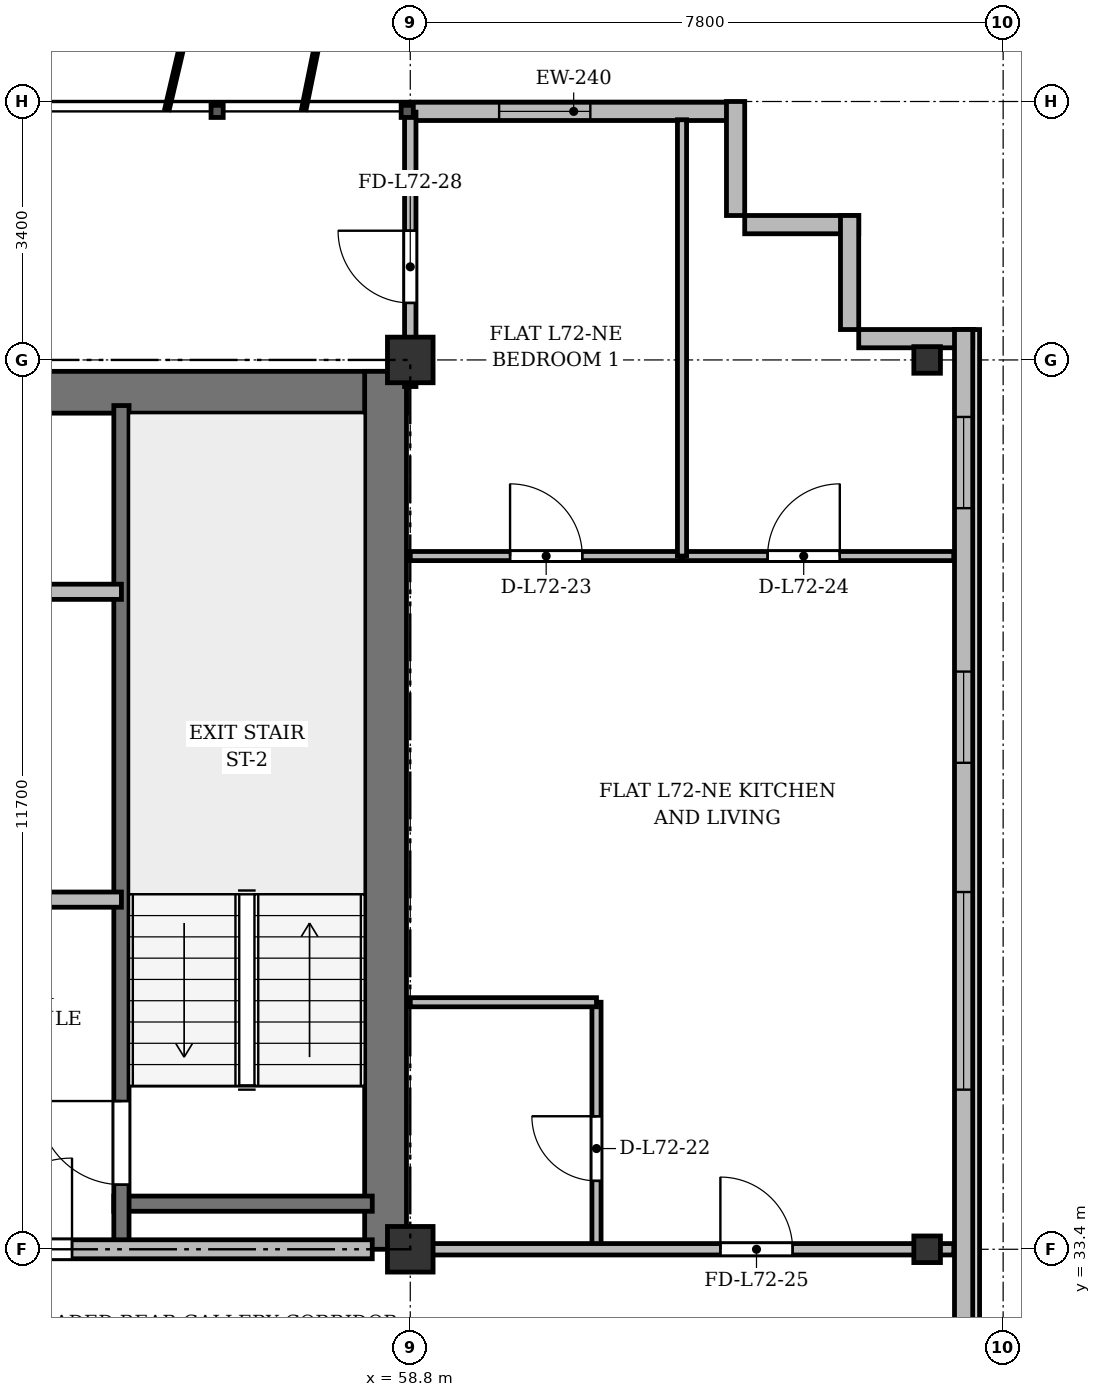
"""IFC4 building model, lengths in metres.
Left out: names, types, materials, properties, quantities, classifications, styles, units other than length and angle.
Written with IfcOpenShell. Run it as: python <this file> out.ifc"""

import sys

from ifc_helpers import new_model, si_unit, direction, frame, frame_2d, origin, origin_2d, place, context, subcontext, project, spatial, rectangle, i_section, extrude, source, transform, mapped, element, fill, save


model = new_model("IFC4")
c1 = context("Model", 3, precision=1e-05, world=origin(), true_north=direction((0.0, 1.0)))
c2 = subcontext(c1, "Body", "Model", "MODEL_VIEW")
j1 = project(units=[si_unit("LENGTHUNIT", "METRE"), si_unit("PLANEANGLEUNIT", "RADIAN")], contexts=[c1])
p1 = place(None, origin())
s1 = spatial("IfcSite", under=j1, at=p1, CompositionType="ELEMENT")
p2 = place(p1, origin())
s2 = spatial("IfcBuilding", under=s1, at=p2, CompositionType="ELEMENT")
p3 = place(p2, frame((0.0, 0.0, 277.5)))
s3 = spatial("IfcBuildingStorey", under=s2, at=p3, CompositionType="ELEMENT", Elevation=277.5)
m1 = source(origin(), c2, "Body", "SweptSolid", [
    extrude(rectangle(XDim=0.6, YDim=0.6, at=origin_2d()), origin(), (0.0, 0.0, 1.0), 3.6),
])
for number, where, z_axis, x_axis in (
    (1, (58.8, 33.4, 0.0), (0.0, 0.0, 1.0), (1.0, 0.0, 0.0)),
    (2, (58.8, 45.1, 0.0), (0.0, 0.0, 1.0), (1.0, 0.0, 0.0)),
):
    element("IfcColumn", number, at=place(p3, frame(where, z_axis=z_axis, x_axis=x_axis)), inside=s3, PredefinedType="COLUMN", context=c2, shape_type="MappedRepresentation", body=[
        mapped(m1, transform((0.0, 0.0, 0.0), x_axis=(1.0, 0.0, 0.0), y_axis=(0.0, 1.0, 0.0), z_axis=(0.0, 0.0, 1.0), scale=1.0)),
    ])
m2 = source(origin(), c2, "Body", "SweptSolid", [
    extrude(i_section(OverallWidth=0.35, OverallDepth=0.35, WebThickness=0.018, FlangeThickness=0.028, at=origin_2d()), origin(), (0.0, 0.0, 1.0), 3.6),
])
for number, where, z_axis, x_axis in (
    (3, (65.6, 33.4, 0.0), (0.0, 0.0, 1.0), (1.0, 0.0, 0.0)),
    (4, (65.6, 45.1, 0.0), (0.0, 0.0, 1.0), (1.0, 0.0, 0.0)),
):
    element("IfcColumn", number, at=place(p3, frame(where, z_axis=z_axis, x_axis=x_axis)), inside=s3, PredefinedType="COLUMN", context=c2, shape_type="MappedRepresentation", body=[
        mapped(m2, transform((0.0, 0.0, 0.0), x_axis=(1.0, 0.0, 0.0), y_axis=(0.0, 1.0, 0.0), z_axis=(0.0, 0.0, 1.0), scale=1.0)),
    ])
p4 = place(p3, frame((58.8, 48.37, 0.0), z_axis=(0.0, 0.0, 1.0), x_axis=(1.0, 0.0, 0.0)))
e5 = element("IfcWall", 5, at=p4, inside=s3, PredefinedType="SOLIDWALL", context=c2, shape_type="SweptSolid", body=[
    extrude(rectangle(XDim=4.3, YDim=0.24, at=frame_2d((2.15, 0.0))), origin(), (0.0, 0.0, 1.0), 3.37),
])
p5 = place(p4, frame((1.169, 0.0, 0.9)))
e6 = element("IfcOpeningElement", 6, at=p5, cuts=e5, PredefinedType="OPENING", context=c2, shape_type="SweptSolid", body=[
    extrude(rectangle(XDim=1.2, YDim=1.65, at=frame_2d((0.6, 0.825))), frame((0.0, 0.13, 0.0), z_axis=(0.0, -1.0, 0.0), x_axis=(1.0, 0.0, 0.0)), (0.0, 0.0, 1.0), 0.26),
])
for number, where, z_axis, x_axis in (
    (7, (63.08, 48.5, 0.0), (0.0, 0.0, 1.0), (0.0, -1.0, 0.0)),
    (8, (63.2, 46.88, 0.0), (0.0, 0.0, 1.0), (1.0, 0.0, 0.0)),
    (9, (64.58, 47.0, 0.0), (0.0, 0.0, 1.0), (0.0, -1.0, 0.0)),
    (10, (64.7, 45.38, 0.0), (0.0, 0.0, 1.0), (1.0, 0.0, 0.0)),
):
    element("IfcWall", number, at=place(p3, frame(where, z_axis=z_axis, x_axis=x_axis)), inside=s3, PredefinedType="SOLIDWALL", context=c2, shape_type="SweptSolid", body=[
        extrude(rectangle(XDim=1.5, YDim=0.24, at=frame_2d((0.75, 0.0))), origin(), (0.0, 0.0, 1.0), 3.37),
    ])
p6 = place(p3, frame((66.08, 45.5, 0.0), z_axis=(0.0, 0.0, 1.0), x_axis=(0.0, -1.0, 0.0)))
e11 = element("IfcWall", 11, at=p6, inside=s3, PredefinedType="SOLIDWALL", context=c2, shape_type="SweptSolid", body=[
    extrude(rectangle(XDim=39.0, YDim=0.24, at=frame_2d((19.5, 0.0))), origin(), (0.0, 0.0, 1.0), 3.37),
])
p7 = place(p6, frame((36.35, 0.0, 0.92)))
e12 = element("IfcOpeningElement", 12, at=p7, cuts=e11, PredefinedType="OPENING", context=c2, shape_type="SweptSolid", body=[
    extrude(rectangle(XDim=1.2, YDim=1.65, at=frame_2d((0.6, 0.825))), frame((0.0, 0.13, 0.0), z_axis=(0.0, -1.0, 0.0), x_axis=(1.0, 0.0, 0.0)), (0.0, 0.0, 1.0), 0.26),
])
p8 = place(p6, frame((32.8, 0.0, 0.92)))
e13 = element("IfcOpeningElement", 13, at=p8, cuts=e11, PredefinedType="OPENING", context=c2, shape_type="SweptSolid", body=[
    extrude(rectangle(XDim=2.6, YDim=1.9, at=frame_2d((1.3, 0.95))), frame((0.0, 0.13, 0.0), z_axis=(0.0, -1.0, 0.0), x_axis=(1.0, 0.0, 0.0)), (0.0, 0.0, 1.0), 0.26),
])
p9 = place(p6, frame((28.6, 0.0, 0.92)))
e14 = element("IfcOpeningElement", 14, at=p9, cuts=e11, PredefinedType="OPENING", context=c2, shape_type="SweptSolid", body=[
    extrude(rectangle(XDim=2.6, YDim=1.9, at=frame_2d((1.3, 0.95))), frame((0.0, 0.13, 0.0), z_axis=(0.0, -1.0, 0.0), x_axis=(1.0, 0.0, 0.0)), (0.0, 0.0, 1.0), 0.26),
])
p10 = place(p6, frame((21.4, 0.0, 0.92)))
e15 = element("IfcOpeningElement", 15, at=p10, cuts=e11, PredefinedType="OPENING", context=c2, shape_type="SweptSolid", body=[
    extrude(rectangle(XDim=2.6, YDim=1.9, at=frame_2d((1.3, 0.95))), frame((0.0, 0.13, 0.0), z_axis=(0.0, -1.0, 0.0), x_axis=(1.0, 0.0, 0.0)), (0.0, 0.0, 1.0), 0.26),
])
p11 = place(p6, frame((7.4, 0.0, 0.92)))
e16 = element("IfcOpeningElement", 16, at=p11, cuts=e11, PredefinedType="OPENING", context=c2, shape_type="SweptSolid", body=[
    extrude(rectangle(XDim=2.6, YDim=1.9, at=frame_2d((1.3, 0.95))), frame((0.0, 0.13, 0.0), z_axis=(0.0, -1.0, 0.0), x_axis=(1.0, 0.0, 0.0)), (0.0, 0.0, 1.0), 0.26),
])
p12 = place(p6, frame((4.5, 0.0, 0.92)))
e17 = element("IfcOpeningElement", 17, at=p12, cuts=e11, PredefinedType="OPENING", context=c2, shape_type="SweptSolid", body=[
    extrude(rectangle(XDim=1.2, YDim=1.65, at=frame_2d((0.6, 0.825))), frame((0.0, 0.13, 0.0), z_axis=(0.0, -1.0, 0.0), x_axis=(1.0, 0.0, 0.0)), (0.0, 0.0, 1.0), 0.26),
])
p13 = place(p6, frame((1.15, 0.0, 0.92)))
e18 = element("IfcOpeningElement", 18, at=p13, cuts=e11, PredefinedType="OPENING", context=c2, shape_type="SweptSolid", body=[
    extrude(rectangle(XDim=1.2, YDim=1.65, at=frame_2d((0.6, 0.825))), frame((0.0, 0.13, 0.0), z_axis=(0.0, -1.0, 0.0), x_axis=(1.0, 0.0, 0.0)), (0.0, 0.0, 1.0), 0.26),
])
p14 = place(p3, frame((15.65, 44.675, 0.0), z_axis=(0.0, 0.0, 1.0), x_axis=(1.0, 0.0, 0.0)))
e19 = element("IfcWall", 19, at=p14, inside=s3, PredefinedType="SHEAR", context=c2, shape_type="SweptSolid", body=[
    extrude(rectangle(XDim=43.1, YDim=0.55, at=frame_2d((21.55, 0.0))), origin(), (0.0, 0.0, 1.0), 3.37),
])
p15 = place(p3, frame((58.475, 33.4, 0.0), z_axis=(0.0, 0.0, 1.0), x_axis=(0.0, 1.0, 0.0)))
e20 = element("IfcWall", 20, at=p15, inside=s3, PredefinedType="SHEAR", context=c2, shape_type="SweptSolid", body=[
    extrude(rectangle(XDim=11.55, YDim=0.55, at=frame_2d((5.775, 0.0))), origin(), (0.0, 0.0, 1.0), 3.37),
])
p16 = place(p3, frame((54.9, 34.0, 0.0), z_axis=(0.0, 0.0, 1.0), x_axis=(1.0, 0.0, 0.0)))
e21 = element("IfcWall", 21, at=p16, inside=s3, PredefinedType="SHEAR", context=c2, shape_type="SweptSolid", body=[
    extrude(rectangle(XDim=3.4, YDim=0.2, at=frame_2d((1.7, 0.0))), origin(), (0.0, 0.0, 1.0), 3.37),
])
p17 = place(p3, frame((55.0, 33.4, 0.0), z_axis=(0.0, 0.0, 1.0), x_axis=(0.0, 1.0, 0.0)))
e22 = element("IfcWall", 22, at=p17, inside=s3, PredefinedType="SHEAR", context=c2, shape_type="SweptSolid", body=[
    extrude(rectangle(XDim=11.1, YDim=0.2, at=frame_2d((5.55, 0.0))), origin(), (0.0, 0.0, 1.0), 3.37),
])
p18 = place(p17, frame((0.85, 0.0, 0.0)))
e23 = element("IfcOpeningElement", 23, at=p18, cuts=e22, PredefinedType="OPENING", context=c2, shape_type="SweptSolid", body=[
    extrude(rectangle(XDim=1.1, YDim=2.15, at=frame_2d((0.55, 1.075))), frame((0.0, 0.11, 0.0), z_axis=(0.0, -1.0, 0.0), x_axis=(1.0, 0.0, 0.0)), (0.0, 0.0, 1.0), 0.22),
])
p19 = place(p3, frame((47.15, 42.05, 0.0), z_axis=(0.0, 0.0, 1.0), x_axis=(1.0, 0.0, 0.0)))
e24 = element("IfcWall", 24, at=p19, inside=s3, PredefinedType="SOLIDWALL", context=c2, shape_type="SweptSolid", body=[
    extrude(rectangle(XDim=7.85, YDim=0.2, at=frame_2d((3.925, 0.0))), origin(), (0.0, 0.0, 1.0), 2.87),
])
p20 = place(p19, frame((0.75, 0.0, 0.0)))
e25 = element("IfcOpeningElement", 25, at=p20, cuts=e24, PredefinedType="OPENING", context=c2, shape_type="SweptSolid", body=[
    extrude(rectangle(XDim=0.9, YDim=2.1, at=frame_2d((0.45, 1.05))), frame((0.0, 0.11, 0.0), z_axis=(0.0, -1.0, 0.0), x_axis=(1.0, 0.0, 0.0)), (0.0, 0.0, 1.0), 0.22),
])
p21 = place(p19, frame((3.85, 0.0, 0.0)))
e26 = element("IfcOpeningElement", 26, at=p21, cuts=e24, PredefinedType="OPENING", context=c2, shape_type="SweptSolid", body=[
    extrude(rectangle(XDim=0.9, YDim=2.1, at=frame_2d((0.45, 1.05))), frame((0.0, 0.11, 0.0), z_axis=(0.0, -1.0, 0.0), x_axis=(1.0, 0.0, 0.0)), (0.0, 0.0, 1.0), 0.22),
])
p22 = place(p3, frame((52.45, 38.0, 0.0), z_axis=(0.0, 0.0, 1.0), x_axis=(1.0, 0.0, 0.0)))
e27 = element("IfcWall", 27, at=p22, inside=s3, PredefinedType="PARTITIONING", context=c2, shape_type="SweptSolid", body=[
    extrude(rectangle(XDim=2.55, YDim=0.2, at=frame_2d((1.275, 0.0))), origin(), (0.0, 0.0, 1.0), 3.37),
])
p23 = place(p3, frame((47.15, 33.4, 0.0), z_axis=(0.0, 0.0, 1.0), x_axis=(1.0, 0.0, 0.0)))
e28 = element("IfcWall", 28, at=p23, inside=s3, PredefinedType="PARTITIONING", context=c2, shape_type="SweptSolid", body=[
    extrude(rectangle(XDim=11.15, YDim=0.25, at=frame_2d((5.575, 0.0))), origin(), (0.0, 0.0, 1.0), 2.92),
])
p24 = place(p23, frame((0.7, 0.0, 0.0)))
e29 = element("IfcOpeningElement", 29, at=p24, cuts=e28, PredefinedType="OPENING", context=c2, shape_type="SweptSolid", body=[
    extrude(rectangle(XDim=0.95, YDim=2.15, at=frame_2d((0.475, 1.075))), frame((0.0, 0.135, 0.0), z_axis=(0.0, -1.0, 0.0), x_axis=(1.0, 0.0, 0.0)), (0.0, 0.0, 1.0), 0.27),
])
p25 = place(p23, frame((6.0, 0.0, 0.0)))
e30 = element("IfcOpeningElement", 30, at=p25, cuts=e28, PredefinedType="OPENING", context=c2, shape_type="SweptSolid", body=[
    extrude(rectangle(XDim=1.2, YDim=2.15, at=frame_2d((0.6, 1.075))), frame((0.0, 0.135, 0.0), z_axis=(0.0, -1.0, 0.0), x_axis=(1.0, 0.0, 0.0)), (0.0, 0.0, 1.0), 0.27),
])
p26 = place(p3, frame((61.25, 33.4, 0.0), z_axis=(0.0, 0.0, 1.0), x_axis=(0.0, 1.0, 0.0)))
e31 = element("IfcWall", 31, at=p26, inside=s3, PredefinedType="PARTITIONING", context=c2, shape_type="SweptSolid", body=[
    extrude(rectangle(XDim=3.25, YDim=0.12, at=frame_2d((1.625, 0.0))), origin(), (0.0, 0.0, 1.0), 2.92),
])
p27 = place(p26, frame((0.9, 0.0, 0.0)))
e32 = element("IfcOpeningElement", 32, at=p27, cuts=e31, PredefinedType="OPENING", context=c2, shape_type="SweptSolid", body=[
    extrude(rectangle(XDim=0.85, YDim=2.1, at=frame_2d((0.425, 1.05))), frame((0.0, 0.07, 0.0), z_axis=(0.0, -1.0, 0.0), x_axis=(1.0, 0.0, 0.0)), (0.0, 0.0, 1.0), 0.14),
])
p28 = place(p3, frame((58.8, 36.65, 0.0), z_axis=(0.0, 0.0, 1.0), x_axis=(1.0, 0.0, 0.0)))
e33 = element("IfcWall", 33, at=p28, inside=s3, PredefinedType="PARTITIONING", context=c2, shape_type="SweptSolid", body=[
    extrude(rectangle(XDim=2.45, YDim=0.12, at=frame_2d((1.225, 0.0))), origin(), (0.0, 0.0, 1.0), 2.87),
])
p29 = place(p3, frame((58.8, 42.52, 0.0), z_axis=(0.0, 0.0, 1.0), x_axis=(1.0, 0.0, 0.0)))
e34 = element("IfcWall", 34, at=p29, inside=s3, PredefinedType="PARTITIONING", context=c2, shape_type="SweptSolid", body=[
    extrude(rectangle(XDim=3.575, YDim=0.12, at=frame_2d((1.788, 0.0))), origin(), (0.0, 0.0, 1.0), 2.87),
])
p30 = place(p29, frame((1.313, 0.0, 0.0)))
e35 = element("IfcOpeningElement", 35, at=p30, cuts=e34, PredefinedType="OPENING", context=c2, shape_type="SweptSolid", body=[
    extrude(rectangle(XDim=0.95, YDim=2.15, at=frame_2d((0.475, 1.075))), frame((0.0, 0.07, 0.0), z_axis=(0.0, -1.0, 0.0), x_axis=(1.0, 0.0, 0.0)), (0.0, 0.0, 1.0), 0.14),
])
p31 = place(p3, frame((62.375, 42.52, 0.0), z_axis=(0.0, 0.0, 1.0), x_axis=(1.0, 0.0, 0.0)))
e36 = element("IfcWall", 36, at=p31, inside=s3, PredefinedType="PARTITIONING", context=c2, shape_type="SweptSolid", body=[
    extrude(rectangle(XDim=3.575, YDim=0.12, at=frame_2d((1.788, 0.0))), origin(), (0.0, 0.0, 1.0), 2.87),
])
p32 = place(p31, frame((1.126, 0.0, 0.0)))
e37 = element("IfcOpeningElement", 37, at=p32, cuts=e36, PredefinedType="OPENING", context=c2, shape_type="SweptSolid", body=[
    extrude(rectangle(XDim=0.95, YDim=2.15, at=frame_2d((0.475, 1.075))), frame((0.0, 0.07, 0.0), z_axis=(0.0, -1.0, 0.0), x_axis=(1.0, 0.0, 0.0)), (0.0, 0.0, 1.0), 0.14),
])
p33 = place(p3, frame((62.375, 42.52, 0.0), z_axis=(0.0, 0.0, 1.0), x_axis=(0.0, 1.0, 0.0)))
e38 = element("IfcWall", 38, at=p33, inside=s3, PredefinedType="PARTITIONING", context=c2, shape_type="SweptSolid", body=[
    extrude(rectangle(XDim=5.74, YDim=0.12, at=frame_2d((2.87, 0.0))), origin(), (0.0, 0.0, 1.0), 2.92),
])
p34 = place(p3, frame((58.8, 33.4, 0.0), z_axis=(0.0, 0.0, 1.0), x_axis=(1.0, 0.0, 0.0)))
e39 = element("IfcWall", 39, at=p34, inside=s3, PredefinedType="PARTITIONING", context=c2, shape_type="SweptSolid", body=[
    extrude(rectangle(XDim=7.15, YDim=0.15, at=frame_2d((3.575, 0.0))), origin(), (0.0, 0.0, 1.0), 2.92),
])
p35 = place(p34, frame((4.08, 0.0, 0.0)))
e40 = element("IfcOpeningElement", 40, at=p35, cuts=e39, PredefinedType="OPENING", context=c2, shape_type="SweptSolid", body=[
    extrude(rectangle(XDim=0.95, YDim=2.15, at=frame_2d((0.475, 1.075))), frame((0.0, 0.085, 0.0), z_axis=(0.0, -1.0, 0.0), x_axis=(1.0, 0.0, 0.0)), (0.0, 0.0, 1.0), 0.17),
])
p36 = place(p3, frame((58.8, 44.75, 0.0), z_axis=(0.0, 0.0, 1.0), x_axis=(0.0, 1.0, 0.0)))
e41 = element("IfcWall", 41, at=p36, inside=s3, PredefinedType="PARTITIONING", context=c2, shape_type="SweptSolid", body=[
    extrude(rectangle(XDim=3.61, YDim=0.15, at=frame_2d((1.805, 0.0))), origin(), (0.0, 0.0, 1.0), 2.87),
])
p37 = place(p36, frame((1.1, 0.0, 0.0)))
e42 = element("IfcOpeningElement", 42, at=p37, cuts=e41, PredefinedType="OPENING", context=c2, shape_type="SweptSolid", body=[
    extrude(rectangle(XDim=0.95, YDim=2.15, at=frame_2d((0.475, 1.075))), frame((0.0, 0.085, 0.0), z_axis=(0.0, -1.0, 0.0), x_axis=(1.0, 0.0, 0.0)), (0.0, 0.0, 1.0), 0.17),
])
m3 = source(origin(), c2, "Body", "SweptSolid", [
    extrude(rectangle(XDim=1.2, YDim=1.65, at=frame_2d((0.6, 0.825))), frame((0.0, 0.03, 0.0), z_axis=(0.0, -1.0, 0.0), x_axis=(1.0, 0.0, 0.0)), (0.0, 0.0, 1.0), 0.06),
])
p38 = place(p5, origin())
e43 = element("IfcWindow", 43, at=p38, inside=s3, PartitioningType="SINGLE_PANEL", PredefinedType="WINDOW", context=c2, shape_type="MappedRepresentation", body=[
    mapped(m3, transform((0.0, 0.0, 0.0), x_axis=(1.0, 0.0, 0.0), y_axis=(0.0, 1.0, 0.0), z_axis=(0.0, 0.0, 1.0), scale=1.0)),
])
fill(e6, e43)
m4 = source(origin(), c2, "Body", "SweptSolid", [
    extrude(rectangle(XDim=2.6, YDim=1.9, at=frame_2d((1.3, 0.95))), frame((0.0, 0.03, 0.0), z_axis=(0.0, -1.0, 0.0), x_axis=(1.0, 0.0, 0.0)), (0.0, 0.0, 1.0), 0.06),
])
p39 = place(p11, origin())
e44 = element("IfcWindow", 44, at=p39, inside=s3, PartitioningType="SINGLE_PANEL", PredefinedType="WINDOW", context=c2, shape_type="MappedRepresentation", body=[
    mapped(m4, transform((0.0, 0.0, 0.0), x_axis=(1.0, 0.0, 0.0), y_axis=(0.0, 1.0, 0.0), z_axis=(0.0, 0.0, 1.0), scale=1.0)),
])
fill(e16, e44)
p40 = place(p12, origin())
e45 = element("IfcWindow", 45, at=p40, inside=s3, PartitioningType="SINGLE_PANEL", PredefinedType="WINDOW", context=c2, shape_type="MappedRepresentation", body=[
    mapped(m3, transform((0.0, 0.0, 0.0), x_axis=(1.0, 0.0, 0.0), y_axis=(0.0, 1.0, 0.0), z_axis=(0.0, 0.0, 1.0), scale=1.0)),
])
fill(e17, e45)
p41 = place(p13, origin())
e46 = element("IfcWindow", 46, at=p41, inside=s3, PartitioningType="SINGLE_PANEL", PredefinedType="WINDOW", context=c2, shape_type="MappedRepresentation", body=[
    mapped(m3, transform((0.0, 0.0, 0.0), x_axis=(1.0, 0.0, 0.0), y_axis=(0.0, 1.0, 0.0), z_axis=(0.0, 0.0, 1.0), scale=1.0)),
])
fill(e18, e46)
m5 = source(origin(), c2, "Body", "SweptSolid", [
    extrude(rectangle(XDim=1.1, YDim=2.15, at=frame_2d((0.55, 1.075))), frame((0.0, 0.025, 0.0), z_axis=(0.0, -1.0, 0.0), x_axis=(1.0, 0.0, 0.0)), (0.0, 0.0, 1.0), 0.05),
])
p42 = place(p18, origin())
e47 = element("IfcDoor", 47, at=p42, inside=s3, OperationType="SINGLE_SWING_RIGHT", PredefinedType="DOOR", context=c2, shape_type="MappedRepresentation", body=[
    mapped(m5, transform((0.0, 0.0, 0.0), x_axis=(1.0, 0.0, 0.0), y_axis=(0.0, 1.0, 0.0), z_axis=(0.0, 0.0, 1.0), scale=1.0)),
])
fill(e23, e47)
m6 = source(origin(), c2, "Body", "SweptSolid", [
    extrude(rectangle(XDim=1.2, YDim=2.15, at=frame_2d((0.6, 1.075))), frame((0.0, 0.025, 0.0), z_axis=(0.0, -1.0, 0.0), x_axis=(1.0, 0.0, 0.0)), (0.0, 0.0, 1.0), 0.05),
])
p43 = place(p25, origin())
e48 = element("IfcDoor", 48, at=p43, inside=s3, OperationType="SINGLE_SWING_RIGHT", PredefinedType="DOOR", context=c2, shape_type="MappedRepresentation", body=[
    mapped(m6, transform((0.0, 0.0, 0.0), x_axis=(1.0, 0.0, 0.0), y_axis=(0.0, 1.0, 0.0), z_axis=(0.0, 0.0, 1.0), scale=1.0)),
])
fill(e30, e48)
m7 = source(origin(), c2, "Body", "SweptSolid", [
    extrude(rectangle(XDim=0.85, YDim=2.1, at=frame_2d((0.425, 1.05))), frame((0.0, 0.025, 0.0), z_axis=(0.0, -1.0, 0.0), x_axis=(1.0, 0.0, 0.0)), (0.0, 0.0, 1.0), 0.05),
])
p44 = place(p27, origin())
e49 = element("IfcDoor", 49, at=p44, inside=s3, OperationType="SINGLE_SWING_RIGHT", PredefinedType="DOOR", context=c2, shape_type="MappedRepresentation", body=[
    mapped(m7, transform((0.0, 0.0, 0.0), x_axis=(1.0, 0.0, 0.0), y_axis=(0.0, 1.0, 0.0), z_axis=(0.0, 0.0, 1.0), scale=1.0)),
])
fill(e32, e49)
m8 = source(origin(), c2, "Body", "SweptSolid", [
    extrude(rectangle(XDim=0.95, YDim=2.15, at=frame_2d((0.475, 1.075))), frame((0.0, 0.025, 0.0), z_axis=(0.0, -1.0, 0.0), x_axis=(1.0, 0.0, 0.0)), (0.0, 0.0, 1.0), 0.05),
])
p45 = place(p30, origin())
e50 = element("IfcDoor", 50, at=p45, inside=s3, OperationType="SINGLE_SWING_LEFT", PredefinedType="DOOR", context=c2, shape_type="MappedRepresentation", body=[
    mapped(m8, transform((0.0, 0.0, 0.0), x_axis=(1.0, 0.0, 0.0), y_axis=(0.0, 1.0, 0.0), z_axis=(0.0, 0.0, 1.0), scale=1.0)),
])
fill(e35, e50)
p46 = place(p32, origin())
e51 = element("IfcDoor", 51, at=p46, inside=s3, OperationType="SINGLE_SWING_RIGHT", PredefinedType="DOOR", context=c2, shape_type="MappedRepresentation", body=[
    mapped(m8, transform((0.0, 0.0, 0.0), x_axis=(1.0, 0.0, 0.0), y_axis=(0.0, 1.0, 0.0), z_axis=(0.0, 0.0, 1.0), scale=1.0)),
])
fill(e37, e51)
p47 = place(p35, origin())
e52 = element("IfcDoor", 52, at=p47, inside=s3, OperationType="SINGLE_SWING_LEFT", PredefinedType="DOOR", context=c2, shape_type="MappedRepresentation", body=[
    mapped(m8, transform((0.0, 0.0, 0.0), x_axis=(1.0, 0.0, 0.0), y_axis=(0.0, 1.0, 0.0), z_axis=(0.0, 0.0, 1.0), scale=1.0)),
])
fill(e40, e52)
p48 = place(p37, origin())
e53 = element("IfcDoor", 53, at=p48, inside=s3, OperationType="SINGLE_SWING_RIGHT", PredefinedType="DOOR", context=c2, shape_type="MappedRepresentation", body=[
    mapped(m8, transform((0.0, 0.0, 0.0), x_axis=(1.0, 0.0, 0.0), y_axis=(0.0, 1.0, 0.0), z_axis=(0.0, 0.0, 1.0), scale=1.0)),
])
fill(e42, e53)
save(model, sys.argv[1])
